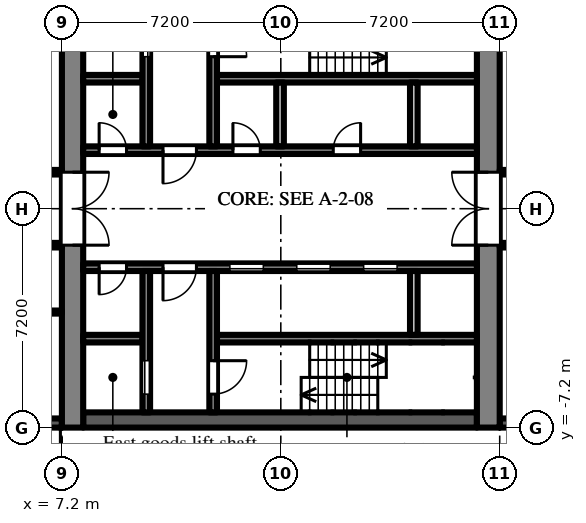
"""IFC4 building model, lengths in metres.
Left out: names, types, materials, properties, quantities, classifications, styles, units other than length and angle.
Written with IfcOpenShell. Run it as: python <this file> out.ifc"""

import sys

from ifc_helpers import new_model, si_unit, direction, frame, frame_2d, origin, place, context, subcontext, project, spatial, rectangle, extrude, element, fill, save


model = new_model("IFC4")
c1 = context("Model", 3, precision=1e-05, world=origin(), true_north=direction((0.0, 1.0)))
c2 = subcontext(c1, "Body", "Model", "MODEL_VIEW")
j1 = project(units=[si_unit("LENGTHUNIT", "METRE"), si_unit("PLANEANGLEUNIT", "RADIAN")], contexts=[c1])
p1 = place(None, origin())
s1 = spatial("IfcSite", under=j1, at=p1, CompositionType="ELEMENT")
p2 = place(p1, origin())
s2 = spatial("IfcBuilding", under=s1, at=p2, CompositionType="ELEMENT")
p3 = place(p2, frame((0.0, 0.0, 44.7)))
s3 = spatial("IfcBuildingStorey", under=s2, at=p3, CompositionType="ELEMENT", Elevation=44.7)
p4 = place(p3, frame((21.6, -7.05, 0.0), z_axis=(0.0, 0.0, 1.0), x_axis=(1.0, 0.0, 0.0)))
e1 = element("IfcWall", 1, at=p4, inside=s3, PredefinedType="SOLIDWALL", context=c2, shape_type="SweptSolid", body=[
    extrude(rectangle(XDim=2.7, YDim=0.3, at=frame_2d((1.35, 0.0))), origin(), (0.0, 0.0, 1.0), 2.1),
])
p5 = place(p3, frame((4.2, -7.05, 0.0), z_axis=(0.0, 0.0, 1.0), x_axis=(1.0, 0.0, 0.0)))
e2 = element("IfcWall", 2, at=p5, inside=s3, PredefinedType="SOLIDWALL", context=c2, shape_type="SweptSolid", body=[
    extrude(rectangle(XDim=3.0, YDim=0.3, at=frame_2d((1.5, 0.0))), origin(), (0.0, 0.0, 1.0), 2.1),
])
p6 = place(p3, frame((7.55, -7.2, 0.0), z_axis=(0.0, 0.0, 1.0), x_axis=(0.0, 1.0, 0.0)))
e3 = element("IfcWall", 3, at=p6, inside=s3, PredefinedType="SHEAR", context=c2, shape_type="SweptSolid", body=[
    extrude(rectangle(XDim=14.4, YDim=0.7, at=frame_2d((7.2, 0.0))), origin(), (0.0, 0.0, 1.0), 2.575),
])
p7 = place(p6, frame((6.0, 0.0, 0.0)))
e4 = element("IfcOpeningElement", 4, at=p7, cuts=e3, PredefinedType="OPENING", context=c2, shape_type="SweptSolid", body=[
    extrude(rectangle(XDim=2.4, YDim=2.2, at=frame_2d((1.2, 1.1))), frame((0.0, 0.36, 0.0), z_axis=(0.0, -1.0, 0.0), x_axis=(1.0, 0.0, 0.0)), (0.0, 0.0, 1.0), 0.72),
])
p8 = place(p3, frame((21.225, -7.2, 0.0), z_axis=(0.0, 0.0, 1.0), x_axis=(0.0, 1.0, 0.0)))
e5 = element("IfcWall", 5, at=p8, inside=s3, PredefinedType="SHEAR", context=c2, shape_type="SweptSolid", body=[
    extrude(rectangle(XDim=14.4, YDim=0.75, at=frame_2d((7.2, 0.0))), origin(), (0.0, 0.0, 1.0), 2.575),
])
p9 = place(p8, frame((6.0, 0.0, 0.0)))
e6 = element("IfcOpeningElement", 6, at=p9, cuts=e5, PredefinedType="OPENING", context=c2, shape_type="SweptSolid", body=[
    extrude(rectangle(XDim=2.4, YDim=2.2, at=frame_2d((1.2, 1.1))), frame((0.0, 0.385, 0.0), z_axis=(0.0, -1.0, 0.0), x_axis=(1.0, 0.0, 0.0)), (0.0, 0.0, 1.0), 0.77),
])
p10 = place(p3, frame((7.9, 1.925, 0.0), z_axis=(0.0, 0.0, 1.0), x_axis=(1.0, 0.0, 0.0)))
e7 = element("IfcWall", 7, at=p10, inside=s3, PredefinedType="SHEAR", context=c2, shape_type="SweptSolid", body=[
    extrude(rectangle(XDim=12.95, YDim=0.25, at=frame_2d((6.475, 0.0))), origin(), (0.0, 0.0, 1.0), 2.575),
])
p11 = place(p10, frame((0.525, 0.0, 0.0)))
e8 = element("IfcOpeningElement", 8, at=p11, cuts=e7, PredefinedType="OPENING", context=c2, shape_type="SweptSolid", body=[
    extrude(rectangle(XDim=0.9, YDim=2.1, at=frame_2d((0.45, 1.05))), frame((0.0, 0.135, 0.0), z_axis=(0.0, -1.0, 0.0), x_axis=(1.0, 0.0, 0.0)), (0.0, 0.0, 1.0), 0.27),
])
p12 = place(p10, frame((2.625, 0.0, 0.0)))
e9 = element("IfcOpeningElement", 9, at=p12, cuts=e7, PredefinedType="OPENING", context=c2, shape_type="SweptSolid", body=[
    extrude(rectangle(XDim=1.1, YDim=2.1, at=frame_2d((0.55, 1.05))), frame((0.0, 0.135, 0.0), z_axis=(0.0, -1.0, 0.0), x_axis=(1.0, 0.0, 0.0)), (0.0, 0.0, 1.0), 0.27),
])
p13 = place(p10, frame((4.925, 0.0, 0.0)))
e10 = element("IfcOpeningElement", 10, at=p13, cuts=e7, PredefinedType="OPENING", context=c2, shape_type="SweptSolid", body=[
    extrude(rectangle(XDim=0.9, YDim=2.1, at=frame_2d((0.45, 1.05))), frame((0.0, 0.135, 0.0), z_axis=(0.0, -1.0, 0.0), x_axis=(1.0, 0.0, 0.0)), (0.0, 0.0, 1.0), 0.27),
])
p14 = place(p10, frame((8.225, 0.0, 0.0)))
e11 = element("IfcOpeningElement", 11, at=p14, cuts=e7, PredefinedType="OPENING", context=c2, shape_type="SweptSolid", body=[
    extrude(rectangle(XDim=0.9, YDim=2.1, at=frame_2d((0.45, 1.05))), frame((0.0, 0.135, 0.0), z_axis=(0.0, -1.0, 0.0), x_axis=(1.0, 0.0, 0.0)), (0.0, 0.0, 1.0), 0.27),
])
p15 = place(p3, frame((7.9, 4.275, 0.0), z_axis=(0.0, 0.0, 1.0), x_axis=(1.0, 0.0, 0.0)))
e12 = element("IfcWall", 12, at=p15, inside=s3, PredefinedType="SHEAR", context=c2, shape_type="SweptSolid", body=[
    extrude(rectangle(XDim=1.95, YDim=0.25, at=frame_2d((0.975, 0.0))), origin(), (0.0, 0.0, 1.0), 2.575),
])
p16 = place(p3, frame((12.3, 4.275, 0.0), z_axis=(0.0, 0.0, 1.0), x_axis=(1.0, 0.0, 0.0)))
e13 = element("IfcWall", 13, at=p16, inside=s3, PredefinedType="SHEAR", context=c2, shape_type="SweptSolid", body=[
    extrude(rectangle(XDim=8.55, YDim=0.25, at=frame_2d((4.275, 0.0))), origin(), (0.0, 0.0, 1.0), 2.575),
])
p17 = place(p3, frame((9.975, 2.05, 0.0), z_axis=(0.0, 0.0, 1.0), x_axis=(0.0, 1.0, 0.0)))
e14 = element("IfcWall", 14, at=p17, inside=s3, PredefinedType="SHEAR", context=c2, shape_type="SweptSolid", body=[
    extrude(rectangle(XDim=4.65, YDim=0.25, at=frame_2d((2.325, 0.0))), origin(), (0.0, 0.0, 1.0), 2.575),
])
p18 = place(p17, frame((2.95, 0.0, 0.0)))
e15 = element("IfcOpeningElement", 15, at=p18, cuts=e14, PredefinedType="OPENING", context=c2, shape_type="SweptSolid", body=[
    extrude(rectangle(XDim=1.1, YDim=2.1, at=frame_2d((0.55, 1.05))), frame((0.0, 0.135, 0.0), z_axis=(0.0, -1.0, 0.0), x_axis=(1.0, 0.0, 0.0)), (0.0, 0.0, 1.0), 0.27),
])
p19 = place(p3, frame((12.175, 2.05, 0.0), z_axis=(0.0, 0.0, 1.0), x_axis=(0.0, 1.0, 0.0)))
e16 = element("IfcWall", 16, at=p19, inside=s3, PredefinedType="SHEAR", context=c2, shape_type="SweptSolid", body=[
    extrude(rectangle(XDim=4.65, YDim=0.25, at=frame_2d((2.325, 0.0))), origin(), (0.0, 0.0, 1.0), 2.575),
])
p20 = place(p19, frame((2.95, 0.0, 0.0)))
e17 = element("IfcOpeningElement", 17, at=p20, cuts=e16, PredefinedType="OPENING", context=c2, shape_type="SweptSolid", body=[
    extrude(rectangle(XDim=1.1, YDim=2.1, at=frame_2d((0.55, 1.05))), frame((0.0, 0.135, 0.0), z_axis=(0.0, -1.0, 0.0), x_axis=(1.0, 0.0, 0.0)), (0.0, 0.0, 1.0), 0.27),
])
for number, where, z_axis, x_axis in (
    (18, (14.375, 2.05, 0.0), (0.0, 0.0, 1.0), (0.0, 1.0, 0.0)),
    (19, (18.775, 2.05, 0.0), (0.0, 0.0, 1.0), (0.0, 1.0, 0.0)),
):
    element("IfcWall", number, at=place(p3, frame(where, z_axis=z_axis, x_axis=x_axis)), inside=s3, PredefinedType="PARTITIONING", context=c2, shape_type="SweptSolid", body=[
        extrude(rectangle(XDim=2.1, YDim=0.25, at=frame_2d((1.05, 0.0))), origin(), (0.0, 0.0, 1.0), 2.575),
    ])
p21 = place(p3, frame((7.9, -6.95, 0.0), z_axis=(0.0, 0.0, 1.0), x_axis=(1.0, 0.0, 0.0)))
e20 = element("IfcWall", 20, at=p21, inside=s3, PredefinedType="SHEAR", context=c2, shape_type="SweptSolid", body=[
    extrude(rectangle(XDim=12.95, YDim=0.5, at=frame_2d((6.475, 0.0))), origin(), (0.0, 0.0, 1.0), 2.575),
])
p22 = place(p3, frame((7.9, -1.925, 0.0), z_axis=(0.0, 0.0, 1.0), x_axis=(1.0, 0.0, 0.0)))
e21 = element("IfcWall", 21, at=p22, inside=s3, PredefinedType="SHEAR", context=c2, shape_type="SweptSolid", body=[
    extrude(rectangle(XDim=12.95, YDim=0.25, at=frame_2d((6.475, 0.0))), origin(), (0.0, 0.0, 1.0), 2.575),
])
p23 = place(p22, frame((4.825, 0.0, 0.0)))
e22 = element("IfcOpeningElement", 22, at=p23, cuts=e21, PredefinedType="OPENING", context=c2, shape_type="SweptSolid", body=[
    extrude(rectangle(XDim=1.1, YDim=2.1, at=frame_2d((0.55, 1.05))), frame((0.0, 0.135, 0.0), z_axis=(0.0, -1.0, 0.0), x_axis=(1.0, 0.0, 0.0)), (0.0, 0.0, 1.0), 0.27),
])
p24 = place(p22, frame((7.025, 0.0, 0.0)))
e23 = element("IfcOpeningElement", 23, at=p24, cuts=e21, PredefinedType="OPENING", context=c2, shape_type="SweptSolid", body=[
    extrude(rectangle(XDim=1.1, YDim=2.1, at=frame_2d((0.55, 1.05))), frame((0.0, 0.135, 0.0), z_axis=(0.0, -1.0, 0.0), x_axis=(1.0, 0.0, 0.0)), (0.0, 0.0, 1.0), 0.27),
])
p25 = place(p22, frame((9.225, 0.0, 0.0)))
e24 = element("IfcOpeningElement", 24, at=p25, cuts=e21, PredefinedType="OPENING", context=c2, shape_type="SweptSolid", body=[
    extrude(rectangle(XDim=1.1, YDim=2.1, at=frame_2d((0.55, 1.05))), frame((0.0, 0.135, 0.0), z_axis=(0.0, -1.0, 0.0), x_axis=(1.0, 0.0, 0.0)), (0.0, 0.0, 1.0), 0.27),
])
p26 = place(p22, frame((0.525, 0.0, 0.0)))
e25 = element("IfcOpeningElement", 25, at=p26, cuts=e21, PredefinedType="OPENING", context=c2, shape_type="SweptSolid", body=[
    extrude(rectangle(XDim=0.9, YDim=2.1, at=frame_2d((0.45, 1.05))), frame((0.0, 0.135, 0.0), z_axis=(0.0, -1.0, 0.0), x_axis=(1.0, 0.0, 0.0)), (0.0, 0.0, 1.0), 0.27),
])
p27 = place(p22, frame((2.625, 0.0, 0.0)))
e26 = element("IfcOpeningElement", 26, at=p27, cuts=e21, PredefinedType="OPENING", context=c2, shape_type="SweptSolid", body=[
    extrude(rectangle(XDim=1.1, YDim=2.1, at=frame_2d((0.55, 1.05))), frame((0.0, 0.135, 0.0), z_axis=(0.0, -1.0, 0.0), x_axis=(1.0, 0.0, 0.0)), (0.0, 0.0, 1.0), 0.27),
])
p28 = place(p3, frame((7.9, -4.275, 0.0), z_axis=(0.0, 0.0, 1.0), x_axis=(1.0, 0.0, 0.0)))
e27 = element("IfcWall", 27, at=p28, inside=s3, PredefinedType="SHEAR", context=c2, shape_type="SweptSolid", body=[
    extrude(rectangle(XDim=1.95, YDim=0.25, at=frame_2d((0.975, 0.0))), origin(), (0.0, 0.0, 1.0), 2.575),
])
p29 = place(p3, frame((12.3, -4.275, 0.0), z_axis=(0.0, 0.0, 1.0), x_axis=(1.0, 0.0, 0.0)))
e28 = element("IfcWall", 28, at=p29, inside=s3, PredefinedType="SHEAR", context=c2, shape_type="SweptSolid", body=[
    extrude(rectangle(XDim=8.55, YDim=0.25, at=frame_2d((4.275, 0.0))), origin(), (0.0, 0.0, 1.0), 2.575),
])
p30 = place(p3, frame((9.975, -2.05, 0.0), z_axis=(0.0, 0.0, 1.0), x_axis=(0.0, -1.0, 0.0)))
e29 = element("IfcWall", 29, at=p30, inside=s3, PredefinedType="SHEAR", context=c2, shape_type="SweptSolid", body=[
    extrude(rectangle(XDim=4.65, YDim=0.25, at=frame_2d((2.325, 0.0))), origin(), (0.0, 0.0, 1.0), 2.575),
])
p31 = place(p30, frame((2.95, 0.0, 0.0)))
e30 = element("IfcOpeningElement", 30, at=p31, cuts=e29, PredefinedType="OPENING", context=c2, shape_type="SweptSolid", body=[
    extrude(rectangle(XDim=1.1, YDim=2.1, at=frame_2d((0.55, 1.05))), frame((0.0, 0.135, 0.0), z_axis=(0.0, -1.0, 0.0), x_axis=(1.0, 0.0, 0.0)), (0.0, 0.0, 1.0), 0.27),
])
p32 = place(p3, frame((12.175, -2.05, 0.0), z_axis=(0.0, 0.0, 1.0), x_axis=(0.0, -1.0, 0.0)))
e31 = element("IfcWall", 31, at=p32, inside=s3, PredefinedType="SHEAR", context=c2, shape_type="SweptSolid", body=[
    extrude(rectangle(XDim=4.65, YDim=0.25, at=frame_2d((2.325, 0.0))), origin(), (0.0, 0.0, 1.0), 2.575),
])
p33 = place(p32, frame((2.95, 0.0, 0.0)))
e32 = element("IfcOpeningElement", 32, at=p33, cuts=e31, PredefinedType="OPENING", context=c2, shape_type="SweptSolid", body=[
    extrude(rectangle(XDim=1.1, YDim=2.1, at=frame_2d((0.55, 1.05))), frame((0.0, 0.135, 0.0), z_axis=(0.0, -1.0, 0.0), x_axis=(1.0, 0.0, 0.0)), (0.0, 0.0, 1.0), 0.27),
])
p34 = place(p3, frame((18.775, -2.05, 0.0), z_axis=(0.0, 0.0, 1.0), x_axis=(0.0, -1.0, 0.0)))
e33 = element("IfcWall", 33, at=p34, inside=s3, PredefinedType="PARTITIONING", context=c2, shape_type="SweptSolid", body=[
    extrude(rectangle(XDim=2.1, YDim=0.25, at=frame_2d((1.05, 0.0))), origin(), (0.0, 0.0, 1.0), 2.575),
])
p35 = place(p3, frame((1.275, -3.4, 0.0), z_axis=(0.0, 0.0, 1.0), x_axis=(1.0, 0.0, 0.0)))
e34 = element("IfcWall", 34, at=p35, inside=s3, PredefinedType="PARTITIONING", context=c2, shape_type="SweptSolid", body=[
    extrude(rectangle(XDim=5.925, YDim=0.1, at=frame_2d((2.962, 0.0))), origin(), (0.0, 0.0, 1.0), 2.575),
])
p36 = place(p3, frame((1.275, -1.2, 0.0), z_axis=(0.0, 0.0, 1.0), x_axis=(1.0, 0.0, 0.0)))
e35 = element("IfcWall", 35, at=p36, inside=s3, PredefinedType="PARTITIONING", context=c2, shape_type="SweptSolid", body=[
    extrude(rectangle(XDim=5.925, YDim=0.15, at=frame_2d((2.962, 0.0))), origin(), (0.0, 0.0, 1.0), 2.575),
])
p37 = place(p36, frame((2.475, 0.0, 0.0)))
e36 = element("IfcOpeningElement", 36, at=p37, cuts=e35, PredefinedType="OPENING", context=c2, shape_type="SweptSolid", body=[
    extrude(rectangle(XDim=0.9, YDim=2.1, at=frame_2d((0.45, 1.05))), frame((0.0, 0.085, 0.0), z_axis=(0.0, -1.0, 0.0), x_axis=(1.0, 0.0, 0.0)), (0.0, 0.0, 1.0), 0.17),
])
p38 = place(p3, frame((1.275, 1.2, 0.0), z_axis=(0.0, 0.0, 1.0), x_axis=(1.0, 0.0, 0.0)))
e37 = element("IfcWall", 37, at=p38, inside=s3, PredefinedType="PARTITIONING", context=c2, shape_type="SweptSolid", body=[
    extrude(rectangle(XDim=5.925, YDim=0.15, at=frame_2d((2.962, 0.0))), origin(), (0.0, 0.0, 1.0), 2.575),
])
p39 = place(p38, frame((0.675, 0.0, 0.0)))
e38 = element("IfcOpeningElement", 38, at=p39, cuts=e37, PredefinedType="OPENING", context=c2, shape_type="SweptSolid", body=[
    extrude(rectangle(XDim=0.9, YDim=2.1, at=frame_2d((0.45, 1.05))), frame((0.0, 0.085, 0.0), z_axis=(0.0, -1.0, 0.0), x_axis=(1.0, 0.0, 0.0)), (0.0, 0.0, 1.0), 0.17),
])
p40 = place(p38, frame((3.075, 0.0, 0.0)))
e39 = element("IfcOpeningElement", 39, at=p40, cuts=e37, PredefinedType="OPENING", context=c2, shape_type="SweptSolid", body=[
    extrude(rectangle(XDim=0.9, YDim=2.1, at=frame_2d((0.45, 1.05))), frame((0.0, 0.085, 0.0), z_axis=(0.0, -1.0, 0.0), x_axis=(1.0, 0.0, 0.0)), (0.0, 0.0, 1.0), 0.17),
])
p41 = place(p3, frame((21.6, -1.2, 0.0), z_axis=(0.0, 0.0, 1.0), x_axis=(1.0, 0.0, 0.0)))
e40 = element("IfcWall", 40, at=p41, inside=s3, PredefinedType="PARTITIONING", context=c2, shape_type="SweptSolid", body=[
    extrude(rectangle(XDim=14.9, YDim=0.15, at=frame_2d((7.45, 0.0))), origin(), (0.0, 0.0, 1.0), 2.575),
])
p42 = place(p41, frame((0.45, 0.0, 0.0)))
e41 = element("IfcOpeningElement", 41, at=p42, cuts=e40, PredefinedType="OPENING", context=c2, shape_type="SweptSolid", body=[
    extrude(rectangle(XDim=0.9, YDim=2.1, at=frame_2d((0.45, 1.05))), frame((0.0, 0.085, 0.0), z_axis=(0.0, -1.0, 0.0), x_axis=(1.0, 0.0, 0.0)), (0.0, 0.0, 1.0), 0.17),
])
p43 = place(p41, frame((2.25, 0.0, 0.0)))
e42 = element("IfcOpeningElement", 42, at=p43, cuts=e40, PredefinedType="OPENING", context=c2, shape_type="SweptSolid", body=[
    extrude(rectangle(XDim=0.9, YDim=2.1, at=frame_2d((0.45, 1.05))), frame((0.0, 0.085, 0.0), z_axis=(0.0, -1.0, 0.0), x_axis=(1.0, 0.0, 0.0)), (0.0, 0.0, 1.0), 0.17),
])
p44 = place(p41, frame((4.05, 0.0, 0.0)))
e43 = element("IfcOpeningElement", 43, at=p44, cuts=e40, PredefinedType="OPENING", context=c2, shape_type="SweptSolid", body=[
    extrude(rectangle(XDim=0.9, YDim=2.1, at=frame_2d((0.45, 1.05))), frame((0.0, 0.085, 0.0), z_axis=(0.0, -1.0, 0.0), x_axis=(1.0, 0.0, 0.0)), (0.0, 0.0, 1.0), 0.17),
])
p45 = place(p41, frame((5.85, 0.0, 0.0)))
e44 = element("IfcOpeningElement", 44, at=p45, cuts=e40, PredefinedType="OPENING", context=c2, shape_type="SweptSolid", body=[
    extrude(rectangle(XDim=0.9, YDim=2.1, at=frame_2d((0.45, 1.05))), frame((0.0, 0.085, 0.0), z_axis=(0.0, -1.0, 0.0), x_axis=(1.0, 0.0, 0.0)), (0.0, 0.0, 1.0), 0.17),
])
p46 = place(p41, frame((8.55, 0.0, 0.0)))
e45 = element("IfcOpeningElement", 45, at=p46, cuts=e40, PredefinedType="OPENING", context=c2, shape_type="SweptSolid", body=[
    extrude(rectangle(XDim=0.9, YDim=2.1, at=frame_2d((0.45, 1.05))), frame((0.0, 0.085, 0.0), z_axis=(0.0, -1.0, 0.0), x_axis=(1.0, 0.0, 0.0)), (0.0, 0.0, 1.0), 0.17),
])
p47 = place(p41, frame((11.95, 0.0, 0.0)))
e46 = element("IfcOpeningElement", 46, at=p47, cuts=e40, PredefinedType="OPENING", context=c2, shape_type="SweptSolid", body=[
    extrude(rectangle(XDim=1.8, YDim=2.1, at=frame_2d((0.9, 1.05))), frame((0.0, 0.085, 0.0), z_axis=(0.0, -1.0, 0.0), x_axis=(1.0, 0.0, 0.0)), (0.0, 0.0, 1.0), 0.17),
])
p48 = place(p3, frame((21.6, 1.2, 0.0), z_axis=(0.0, 0.0, 1.0), x_axis=(1.0, 0.0, 0.0)))
e47 = element("IfcWall", 47, at=p48, inside=s3, PredefinedType="PARTITIONING", context=c2, shape_type="SweptSolid", body=[
    extrude(rectangle(XDim=14.9, YDim=0.15, at=frame_2d((7.45, 0.0))), origin(), (0.0, 0.0, 1.0), 2.575),
])
p49 = place(p48, frame((1.35, 0.0, 0.0)))
e48 = element("IfcOpeningElement", 48, at=p49, cuts=e47, PredefinedType="OPENING", context=c2, shape_type="SweptSolid", body=[
    extrude(rectangle(XDim=0.9, YDim=2.1, at=frame_2d((0.45, 1.05))), frame((0.0, 0.085, 0.0), z_axis=(0.0, -1.0, 0.0), x_axis=(1.0, 0.0, 0.0)), (0.0, 0.0, 1.0), 0.17),
])
p50 = place(p48, frame((9.49, 0.0, 0.0)))
e49 = element("IfcOpeningElement", 49, at=p50, cuts=e47, PredefinedType="OPENING", context=c2, shape_type="SweptSolid", body=[
    extrude(rectangle(XDim=1.0, YDim=2.1, at=frame_2d((0.5, 1.05))), frame((0.0, 0.085, 0.0), z_axis=(0.0, -1.0, 0.0), x_axis=(1.0, 0.0, 0.0)), (0.0, 0.0, 1.0), 0.17),
])
p51 = place(p48, frame((11.95, 0.0, 0.0)))
e50 = element("IfcOpeningElement", 50, at=p51, cuts=e47, PredefinedType="OPENING", context=c2, shape_type="SweptSolid", body=[
    extrude(rectangle(XDim=1.8, YDim=2.1, at=frame_2d((0.9, 1.05))), frame((0.0, 0.085, 0.0), z_axis=(0.0, -1.0, 0.0), x_axis=(1.0, 0.0, 0.0)), (0.0, 0.0, 1.0), 0.17),
])
p52 = place(p23, origin())
e51 = element("IfcDoor", 51, at=p52, inside=s3, OperationType="SLIDING_TO_LEFT", PredefinedType="DOOR", context=c2, shape_type="SweptSolid", body=[
    extrude(rectangle(XDim=1.1, YDim=2.1, at=frame_2d((0.55, 1.05))), frame((0.0, 0.025, 0.0), z_axis=(0.0, -1.0, 0.0), x_axis=(1.0, 0.0, 0.0)), (0.0, 0.0, 1.0), 0.05),
])
fill(e22, e51)
p53 = place(p24, origin())
e52 = element("IfcDoor", 52, at=p53, inside=s3, OperationType="SLIDING_TO_LEFT", PredefinedType="DOOR", context=c2, shape_type="SweptSolid", body=[
    extrude(rectangle(XDim=1.1, YDim=2.1, at=frame_2d((0.55, 1.05))), frame((0.0, 0.025, 0.0), z_axis=(0.0, -1.0, 0.0), x_axis=(1.0, 0.0, 0.0)), (0.0, 0.0, 1.0), 0.05),
])
fill(e23, e52)
p54 = place(p25, origin())
e53 = element("IfcDoor", 53, at=p54, inside=s3, OperationType="SLIDING_TO_LEFT", PredefinedType="DOOR", context=c2, shape_type="SweptSolid", body=[
    extrude(rectangle(XDim=1.1, YDim=2.1, at=frame_2d((0.55, 1.05))), frame((0.0, 0.025, 0.0), z_axis=(0.0, -1.0, 0.0), x_axis=(1.0, 0.0, 0.0)), (0.0, 0.0, 1.0), 0.05),
])
fill(e24, e53)
p55 = place(p18, origin())
e54 = element("IfcDoor", 54, at=p55, inside=s3, OperationType="SLIDING_TO_LEFT", PredefinedType="DOOR", context=c2, shape_type="SweptSolid", body=[
    extrude(rectangle(XDim=1.1, YDim=2.1, at=frame_2d((0.55, 1.05))), frame((0.0, 0.025, 0.0), z_axis=(0.0, -1.0, 0.0), x_axis=(1.0, 0.0, 0.0)), (0.0, 0.0, 1.0), 0.05),
])
fill(e15, e54)
p56 = place(p31, origin())
e55 = element("IfcDoor", 55, at=p56, inside=s3, OperationType="SLIDING_TO_LEFT", PredefinedType="DOOR", context=c2, shape_type="SweptSolid", body=[
    extrude(rectangle(XDim=1.1, YDim=2.1, at=frame_2d((0.55, 1.05))), frame((0.0, 0.025, 0.0), z_axis=(0.0, -1.0, 0.0), x_axis=(1.0, 0.0, 0.0)), (0.0, 0.0, 1.0), 0.05),
])
fill(e30, e55)
p57 = place(p20, frame((1.1, 0.0, 0.0), z_axis=(0.0, 0.0, 1.0), x_axis=(-1.0, 0.0, 0.0)))
e56 = element("IfcDoor", 56, at=p57, inside=s3, OperationType="SINGLE_SWING_RIGHT", PredefinedType="DOOR", context=c2, shape_type="SweptSolid", body=[
    extrude(rectangle(XDim=1.1, YDim=2.1, at=frame_2d((0.55, 1.05))), frame((0.0, 0.025, 0.0), z_axis=(0.0, -1.0, 0.0), x_axis=(1.0, 0.0, 0.0)), (0.0, 0.0, 1.0), 0.05),
])
fill(e17, e56)
p58 = place(p33, origin())
e57 = element("IfcDoor", 57, at=p58, inside=s3, OperationType="SINGLE_SWING_LEFT", PredefinedType="DOOR", context=c2, shape_type="SweptSolid", body=[
    extrude(rectangle(XDim=1.1, YDim=2.1, at=frame_2d((0.55, 1.05))), frame((0.0, 0.025, 0.0), z_axis=(0.0, -1.0, 0.0), x_axis=(1.0, 0.0, 0.0)), (0.0, 0.0, 1.0), 0.05),
])
fill(e32, e57)
p59 = place(p11, origin())
e58 = element("IfcDoor", 58, at=p59, inside=s3, OperationType="SINGLE_SWING_LEFT", PredefinedType="DOOR", context=c2, shape_type="SweptSolid", body=[
    extrude(rectangle(XDim=0.9, YDim=2.1, at=frame_2d((0.45, 1.05))), frame((0.0, 0.025, 0.0), z_axis=(0.0, -1.0, 0.0), x_axis=(1.0, 0.0, 0.0)), (0.0, 0.0, 1.0), 0.05),
])
fill(e8, e58)
p60 = place(p26, frame((0.9, 0.0, 0.0), z_axis=(0.0, 0.0, 1.0), x_axis=(-1.0, 0.0, 0.0)))
e59 = element("IfcDoor", 59, at=p60, inside=s3, OperationType="SINGLE_SWING_RIGHT", PredefinedType="DOOR", context=c2, shape_type="SweptSolid", body=[
    extrude(rectangle(XDim=0.9, YDim=2.1, at=frame_2d((0.45, 1.05))), frame((0.0, 0.025, 0.0), z_axis=(0.0, -1.0, 0.0), x_axis=(1.0, 0.0, 0.0)), (0.0, 0.0, 1.0), 0.05),
])
fill(e25, e59)
p61 = place(p12, frame((1.1, 0.0, 0.0), z_axis=(0.0, 0.0, 1.0), x_axis=(-1.0, 0.0, 0.0)))
e60 = element("IfcDoor", 60, at=p61, inside=s3, OperationType="SINGLE_SWING_RIGHT", PredefinedType="DOOR", context=c2, shape_type="SweptSolid", body=[
    extrude(rectangle(XDim=1.1, YDim=2.1, at=frame_2d((0.55, 1.05))), frame((0.0, 0.025, 0.0), z_axis=(0.0, -1.0, 0.0), x_axis=(1.0, 0.0, 0.0)), (0.0, 0.0, 1.0), 0.05),
])
fill(e9, e60)
p62 = place(p27, frame((1.1, 0.0, 0.0), z_axis=(0.0, 0.0, 1.0), x_axis=(-1.0, 0.0, 0.0)))
e61 = element("IfcDoor", 61, at=p62, inside=s3, OperationType="SINGLE_SWING_RIGHT", PredefinedType="DOOR", context=c2, shape_type="SweptSolid", body=[
    extrude(rectangle(XDim=1.1, YDim=2.1, at=frame_2d((0.55, 1.05))), frame((0.0, 0.025, 0.0), z_axis=(0.0, -1.0, 0.0), x_axis=(1.0, 0.0, 0.0)), (0.0, 0.0, 1.0), 0.05),
])
fill(e26, e61)
p63 = place(p7, frame((2.4, 0.0, 0.0), z_axis=(0.0, 0.0, 1.0), x_axis=(-1.0, 0.0, 0.0)))
e62 = element("IfcDoor", 62, at=p63, inside=s3, OperationType="DOUBLE_DOOR_DOUBLE_SWING", PredefinedType="DOOR", context=c2, shape_type="SweptSolid", body=[
    extrude(rectangle(XDim=2.4, YDim=2.2, at=frame_2d((1.2, 1.1))), frame((0.0, 0.025, 0.0), z_axis=(0.0, -1.0, 0.0), x_axis=(1.0, 0.0, 0.0)), (0.0, 0.0, 1.0), 0.05),
])
fill(e4, e62)
p64 = place(p9, origin())
e63 = element("IfcDoor", 63, at=p64, inside=s3, OperationType="DOUBLE_DOOR_DOUBLE_SWING", PredefinedType="DOOR", context=c2, shape_type="SweptSolid", body=[
    extrude(rectangle(XDim=2.4, YDim=2.2, at=frame_2d((1.2, 1.1))), frame((0.0, 0.025, 0.0), z_axis=(0.0, -1.0, 0.0), x_axis=(1.0, 0.0, 0.0)), (0.0, 0.0, 1.0), 0.05),
])
fill(e6, e63)
p65 = place(p13, origin())
e64 = element("IfcDoor", 64, at=p65, inside=s3, OperationType="SINGLE_SWING_LEFT", PredefinedType="DOOR", context=c2, shape_type="SweptSolid", body=[
    extrude(rectangle(XDim=0.9, YDim=2.1, at=frame_2d((0.45, 1.05))), frame((0.0, 0.025, 0.0), z_axis=(0.0, -1.0, 0.0), x_axis=(1.0, 0.0, 0.0)), (0.0, 0.0, 1.0), 0.05),
])
fill(e10, e64)
p66 = place(p14, origin())
e65 = element("IfcDoor", 65, at=p66, inside=s3, OperationType="SINGLE_SWING_RIGHT", PredefinedType="DOOR", context=c2, shape_type="SweptSolid", body=[
    extrude(rectangle(XDim=0.9, YDim=2.1, at=frame_2d((0.45, 1.05))), frame((0.0, 0.025, 0.0), z_axis=(0.0, -1.0, 0.0), x_axis=(1.0, 0.0, 0.0)), (0.0, 0.0, 1.0), 0.05),
])
fill(e11, e65)
save(model, sys.argv[1])
